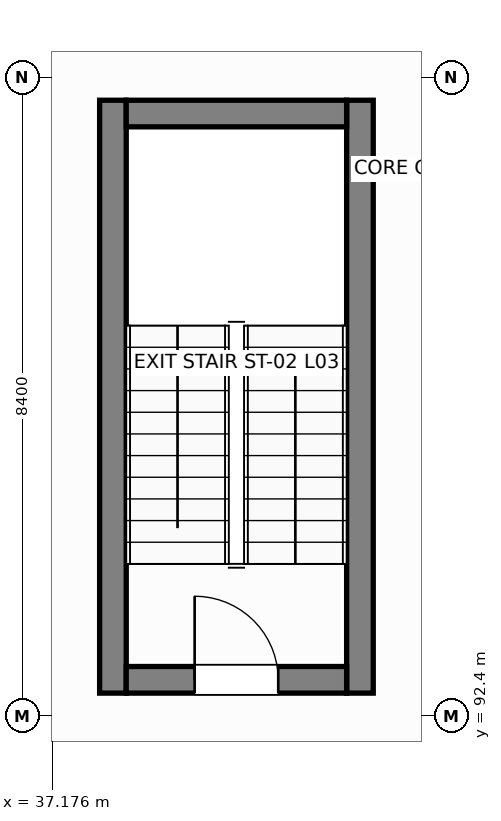
"""IFC4 building model, lengths in metres.
Left out: names, types, materials, properties, quantities, classifications, styles, units other than length and angle.
Written with IfcOpenShell. Run it as: python <this file> out.ifc"""

import sys

from ifc_helpers import new_model, si_unit, direction, frame, frame_2d, origin, place, context, subcontext, project, spatial, rectangle, extrude, element, fill, save


model = new_model("IFC4")
c1 = context("Model", 3, precision=1e-05, world=origin(), true_north=direction((0.0, 1.0)))
c2 = subcontext(c1, "Body", "Model", "MODEL_VIEW")
j1 = project(units=[si_unit("LENGTHUNIT", "METRE"), si_unit("PLANEANGLEUNIT", "RADIAN")], contexts=[c1])
p1 = place(None, origin())
s1 = spatial("IfcSite", under=j1, at=p1, CompositionType="ELEMENT")
p2 = place(p1, origin())
s2 = spatial("IfcBuilding", under=s1, at=p2, CompositionType="ELEMENT")
p3 = place(p2, frame((0.0, 0.0, 13.2)))
s3 = spatial("IfcBuildingStorey", under=s2, at=p3, CompositionType="ELEMENT", Elevation=13.2)
for number, where, z_axis, x_axis in (
    (1, (37.975, 92.7, 0.0), (0.0, 0.0, 1.0), (0.0, 1.0, 0.0)),
    (2, (41.225, 92.7, 0.0), (0.0, 0.0, 1.0), (0.0, 1.0, 0.0)),
):
    element("IfcWall", number, at=place(p3, frame(where, z_axis=z_axis, x_axis=x_axis)), inside=s3, PredefinedType="SHEAR", context=c2, shape_type="SweptSolid", body=[
        extrude(rectangle(XDim=7.8, YDim=0.35, at=frame_2d((3.9, 0.0))), origin(), (0.0, 0.0, 1.0), 3.99),
    ])
p4 = place(p3, frame((38.15, 100.325, 0.0), z_axis=(0.0, 0.0, 1.0), x_axis=(1.0, 0.0, 0.0)))
e3 = element("IfcWall", 3, at=p4, inside=s3, PredefinedType="SHEAR", context=c2, shape_type="SweptSolid", body=[
    extrude(rectangle(XDim=2.9, YDim=0.35, at=frame_2d((1.45, 0.0))), origin(), (0.0, 0.0, 1.0), 3.99),
])
p5 = place(p3, frame((38.15, 92.875, 0.0), z_axis=(0.0, 0.0, 1.0), x_axis=(1.0, 0.0, 0.0)))
e4 = element("IfcWall", 4, at=p5, inside=s3, PredefinedType="SHEAR", context=c2, shape_type="SweptSolid", body=[
    extrude(rectangle(XDim=2.9, YDim=0.35, at=frame_2d((1.45, 0.0))), origin(), (0.0, 0.0, 1.0), 3.99),
])
p6 = place(p5, frame((0.9, 0.0, 0.0)))
e5 = element("IfcOpeningElement", 5, at=p6, cuts=e4, PredefinedType="OPENING", context=c2, shape_type="SweptSolid", body=[
    extrude(rectangle(XDim=1.1, YDim=2.15, at=frame_2d((0.55, 1.075))), frame((0.0, 0.185, 0.0), z_axis=(0.0, -1.0, 0.0), x_axis=(1.0, 0.0, 0.0)), (0.0, 0.0, 1.0), 0.37),
])
p7 = place(p6, origin())
e6 = element("IfcDoor", 6, at=p7, inside=s3, OperationType="SINGLE_SWING_LEFT", PredefinedType="DOOR", context=c2, shape_type="SweptSolid", body=[
    extrude(rectangle(XDim=1.1, YDim=2.15, at=frame_2d((0.55, 1.075))), frame((0.0, 0.025, 0.0), z_axis=(0.0, -1.0, 0.0), x_axis=(1.0, 0.0, 0.0)), (0.0, 0.0, 1.0), 0.05),
])
fill(e5, e6)
save(model, sys.argv[1])
